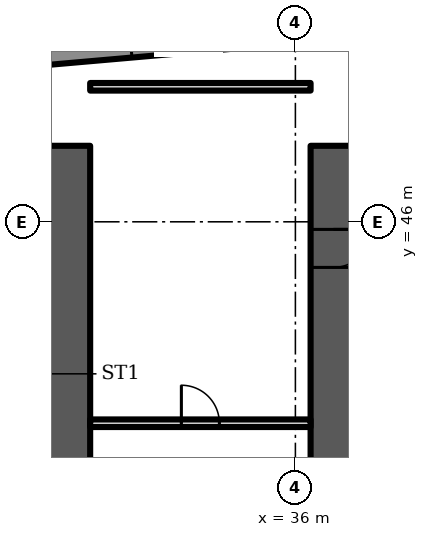
"""IFC4 building model, lengths in metres.
Left out: names, types, materials, properties, quantities, classifications, styles, units other than length and angle.
Written with IfcOpenShell. Run it as: python <this file> out.ifc"""

import sys

from ifc_helpers import new_model, si_unit, direction, frame, frame_2d, origin, place, context, subcontext, project, spatial, rectangle, extrude, element, fill, save


model = new_model("IFC4")
c1 = context("Model", 3, precision=1e-05, world=origin(), true_north=direction((0.0, 1.0)))
c2 = subcontext(c1, "Body", "Model", "MODEL_VIEW")
j1 = project(units=[si_unit("LENGTHUNIT", "METRE"), si_unit("PLANEANGLEUNIT", "RADIAN")], contexts=[c1])
p1 = place(None, origin())
s1 = spatial("IfcSite", under=j1, at=p1, CompositionType="ELEMENT")
p2 = place(p1, origin())
s2 = spatial("IfcBuilding", under=s1, at=p2, CompositionType="ELEMENT")
p3 = place(p2, frame((0.0, 0.0, 8.0)))
s3 = spatial("IfcBuildingStorey", under=s2, at=p3, CompositionType="ELEMENT", Elevation=8.0)
p4 = place(p3, frame((47.301, 50.11, 0.0), z_axis=(0.0, 0.0, 1.0), x_axis=(-0.996195, 0.087143, 0.0)))
e1 = element("IfcWall", 1, at=p4, inside=s3, PredefinedType="SOLIDWALL", context=c2, shape_type="SweptSolid", body=[
    extrude(rectangle(XDim=10.26, YDim=0.45, at=frame_2d((5.13, 0.0))), origin(), (0.0, 0.0, 1.0), 6.7),
])
p5 = place(p4, frame((1.065, 0.0, 1.0)))
e2 = element("IfcOpeningElement", 2, at=p5, cuts=e1, PredefinedType="OPENING", context=c2, shape_type="SweptSolid", body=[
    extrude(rectangle(XDim=3.0, YDim=4.7, at=frame_2d((1.5, 2.35))), frame((0.0, 0.235, 0.0), z_axis=(0.0, -1.0, 0.0), x_axis=(1.0, 0.0, 0.0)), (0.0, 0.0, 1.0), 0.47),
])
p6 = place(p4, frame((6.195, 0.0, 1.0)))
e3 = element("IfcOpeningElement", 3, at=p6, cuts=e1, PredefinedType="OPENING", context=c2, shape_type="SweptSolid", body=[
    extrude(rectangle(XDim=3.0, YDim=4.7, at=frame_2d((1.5, 2.35))), frame((0.0, 0.235, 0.0), z_axis=(0.0, -1.0, 0.0), x_axis=(1.0, 0.0, 0.0)), (0.0, 0.0, 1.0), 0.47),
])
p7 = place(p3, frame((36.0, 50.924, 0.0), z_axis=(0.0, 0.0, 1.0), x_axis=(-0.996195, -0.087145, 0.0)))
e4 = element("IfcWall", 4, at=p7, inside=s3, PredefinedType="SOLIDWALL", context=c2, shape_type="SweptSolid", body=[
    extrude(rectangle(XDim=11.344, YDim=0.45, at=frame_2d((5.672, 0.0))), origin(), (0.0, 0.0, 1.0), 6.7),
])
p8 = place(p7, frame((1.336, 0.0, 1.0)))
e5 = element("IfcOpeningElement", 5, at=p8, cuts=e4, PredefinedType="OPENING", context=c2, shape_type="SweptSolid", body=[
    extrude(rectangle(XDim=3.0, YDim=4.7, at=frame_2d((1.5, 2.35))), frame((0.0, 0.235, 0.0), z_axis=(0.0, -1.0, 0.0), x_axis=(1.0, 0.0, 0.0)), (0.0, 0.0, 1.0), 0.47),
])
p9 = place(p7, frame((7.008, 0.0, 1.0)))
e6 = element("IfcOpeningElement", 6, at=p9, cuts=e4, PredefinedType="OPENING", context=c2, shape_type="SweptSolid", body=[
    extrude(rectangle(XDim=3.0, YDim=4.7, at=frame_2d((1.5, 2.35))), frame((0.0, 0.235, 0.0), z_axis=(0.0, -1.0, 0.0), x_axis=(1.0, 0.0, 0.0)), (0.0, 0.0, 1.0), 0.47),
])
p10 = place(p3, frame((30.0, 35.2, 0.0), z_axis=(0.0, 0.0, 1.0), x_axis=(0.0, 1.0, 0.0)))
e7 = element("IfcWall", 7, at=p10, inside=s3, PredefinedType="SHEAR", context=c2, shape_type="SweptSolid", body=[
    extrude(rectangle(XDim=12.8, YDim=1.2, at=frame_2d((6.4, 0.0))), origin(), (0.0, 0.0, 1.0), 6.7),
])
p11 = place(p10, frame((3.2, 0.0, 0.0)))
e8 = element("IfcOpeningElement", 8, at=p11, cuts=e7, PredefinedType="OPENING", context=c2, shape_type="SweptSolid", body=[
    extrude(rectangle(XDim=1.1, YDim=2.1, at=frame_2d((0.55, 1.05))), frame((0.0, 0.61, 0.0), z_axis=(0.0, -1.0, 0.0), x_axis=(1.0, 0.0, 0.0)), (0.0, 0.0, 1.0), 1.22),
])
p12 = place(p3, frame((37.0, 35.2, 0.0), z_axis=(0.0, 0.0, 1.0), x_axis=(0.0, 1.0, 0.0)))
e9 = element("IfcWall", 9, at=p12, inside=s3, PredefinedType="SHEAR", context=c2, shape_type="SweptSolid", body=[
    extrude(rectangle(XDim=12.8, YDim=1.2, at=frame_2d((6.4, 0.0))), origin(), (0.0, 0.0, 1.0), 6.7),
])
p13 = place(p12, frame((3.2, 0.0, 0.0)))
e10 = element("IfcOpeningElement", 10, at=p13, cuts=e9, PredefinedType="OPENING", context=c2, shape_type="SweptSolid", body=[
    extrude(rectangle(XDim=1.1, YDim=2.1, at=frame_2d((0.55, 1.05))), frame((0.0, 0.61, 0.0), z_axis=(0.0, -1.0, 0.0), x_axis=(1.0, 0.0, 0.0)), (0.0, 0.0, 1.0), 1.22),
])
p14 = place(p12, frame((9.6, 0.0, 0.0)))
e11 = element("IfcOpeningElement", 11, at=p14, cuts=e9, PredefinedType="OPENING", context=c2, shape_type="SweptSolid", body=[
    extrude(rectangle(XDim=1.0, YDim=2.1, at=frame_2d((0.5, 1.05))), frame((0.0, 0.61, 0.0), z_axis=(0.0, -1.0, 0.0), x_axis=(1.0, 0.0, 0.0)), (0.0, 0.0, 1.0), 1.22),
])
p15 = place(p3, frame((30.6, 40.7, 0.0), z_axis=(0.0, 0.0, 1.0), x_axis=(1.0, 0.0, 0.0)))
e12 = element("IfcWall", 12, at=p15, inside=s3, PredefinedType="PARTITIONING", context=c2, shape_type="SweptSolid", body=[
    extrude(rectangle(XDim=5.8, YDim=0.2, at=frame_2d((2.9, 0.0))), origin(), (0.0, 0.0, 1.0), 6.7),
])
p16 = place(p15, frame((2.4, 0.0, 0.0)))
e13 = element("IfcOpeningElement", 13, at=p16, cuts=e12, PredefinedType="OPENING", context=c2, shape_type="SweptSolid", body=[
    extrude(rectangle(XDim=1.0, YDim=2.1, at=frame_2d((0.5, 1.05))), frame((0.0, 0.11, 0.0), z_axis=(0.0, -1.0, 0.0), x_axis=(1.0, 0.0, 0.0)), (0.0, 0.0, 1.0), 0.22),
])
p17 = place(p3, frame((30.6, 49.552, 0.0), z_axis=(0.0, 0.0, 1.0), x_axis=(1.0, 0.0, 0.0)))
e14 = element("IfcWall", 14, at=p17, inside=s3, PredefinedType="PARTITIONING", context=c2, shape_type="SweptSolid", body=[
    extrude(rectangle(XDim=5.8, YDim=0.2, at=frame_2d((2.9, 0.0))), origin(), (0.0, 0.0, 1.0), 6.7),
])
p18 = place(p8, origin())
e15 = element("IfcWindow", 15, at=p18, inside=s3, PartitioningType="SINGLE_PANEL", PredefinedType="WINDOW", context=c2, shape_type="SweptSolid", body=[
    extrude(rectangle(XDim=3.0, YDim=4.7, at=frame_2d((1.5, 2.35))), frame((0.0, 0.105, 0.0), z_axis=(0.0, -1.0, 0.0), x_axis=(1.0, 0.0, 0.0)), (0.0, 0.0, 1.0), 0.06),
])
fill(e5, e15)
p19 = place(p16, origin())
e16 = element("IfcDoor", 16, at=p19, inside=s3, OperationType="SINGLE_SWING_LEFT", PredefinedType="DOOR", context=c2, shape_type="SweptSolid", body=[
    extrude(rectangle(XDim=1.0, YDim=2.1, at=frame_2d((0.5, 1.05))), frame((0.0, 0.025, 0.0), z_axis=(0.0, -1.0, 0.0), x_axis=(1.0, 0.0, 0.0)), (0.0, 0.0, 1.0), 0.05),
])
fill(e13, e16)
p20 = place(p14, origin())
e17 = element("IfcDoor", 17, at=p20, inside=s3, OperationType="SINGLE_SWING_RIGHT", PredefinedType="DOOR", context=c2, shape_type="SweptSolid", body=[
    extrude(rectangle(XDim=1.0, YDim=2.1, at=frame_2d((0.5, 1.05))), frame((0.0, 0.6, 0.0), z_axis=(0.0, -1.0, 0.0), x_axis=(1.0, 0.0, 0.0)), (0.0, 0.0, 1.0), 1.199),
])
fill(e11, e17)
save(model, sys.argv[1])
